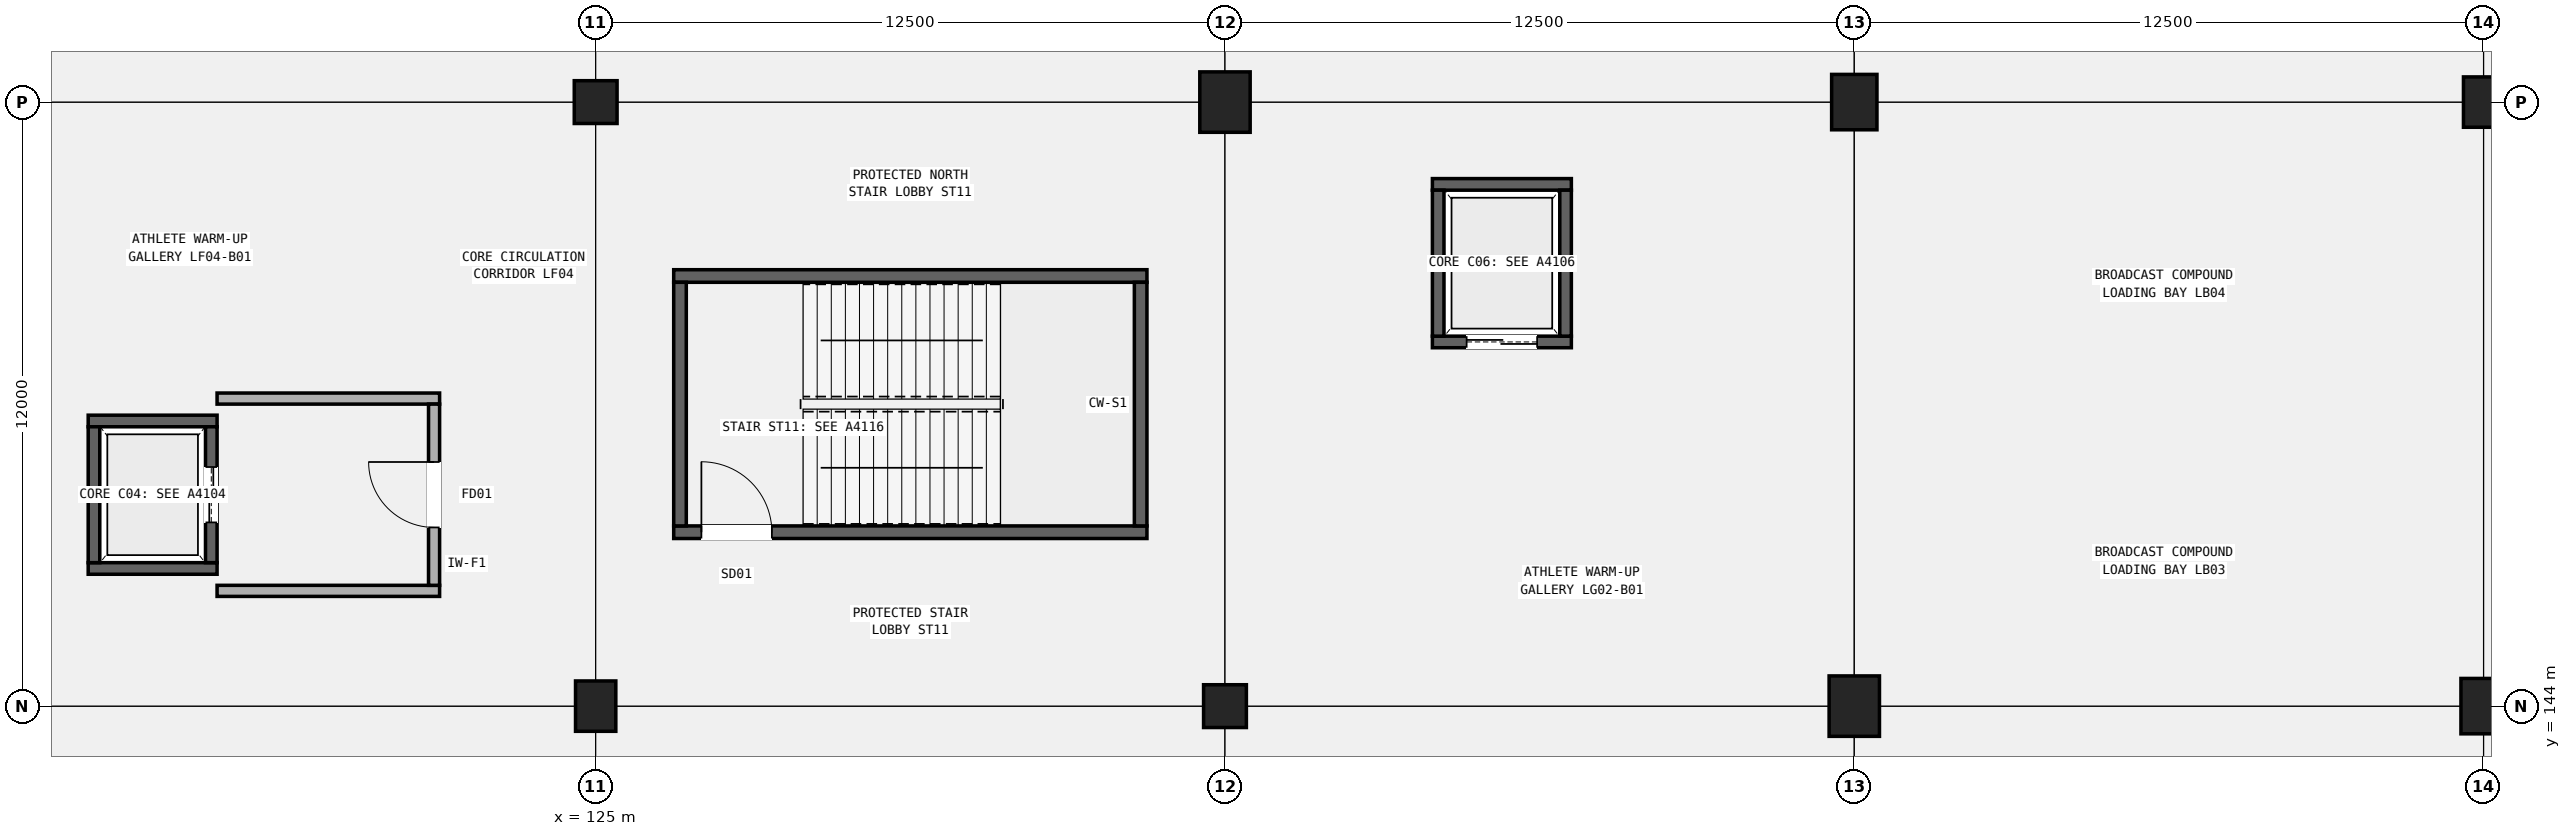
"""IFC4 building model, lengths in metres.
Left out: names, types, materials, properties, quantities, classifications, styles, units other than length and angle.
Written with IfcOpenShell. Run it as: python <this file> out.ifc"""

import sys

from ifc_helpers import new_model, si_unit, direction, frame, frame_2d, origin, origin_2d, place, context, subcontext, project, spatial, rectangle, circle, extrude, element, fill, save


model = new_model("IFC4")
c1 = context("Model", 3, precision=1e-05, world=origin(), true_north=direction((0.0, 1.0)))
c2 = subcontext(c1, "Body", "Model", "MODEL_VIEW")
j1 = project(units=[si_unit("LENGTHUNIT", "METRE"), si_unit("PLANEANGLEUNIT", "RADIAN")], contexts=[c1])
p1 = place(None, origin())
s1 = spatial("IfcSite", under=j1, at=p1, CompositionType="ELEMENT")
p2 = place(p1, origin())
s2 = spatial("IfcBuilding", under=s1, at=p2, CompositionType="ELEMENT")
p3 = place(p2, frame((0.0, 0.0, -4.8)))
s3 = spatial("IfcBuildingStorey", under=s2, at=p3, CompositionType="ELEMENT", Elevation=-4.8)
p4 = place(p3, frame((125.0, 144.0, 0.0), z_axis=(0.0, 0.0, 1.0), x_axis=(1.0, 0.0, 0.0)))
e1 = element("IfcColumn", 1, at=p4, inside=s3, PredefinedType="COLUMN", context=c2, shape_type="SweptSolid", body=[
    extrude(rectangle(XDim=0.8, YDim=1.0, at=origin_2d()), origin(), (0.0, 0.0, 1.0), 4.8),
])
for number, where, z_axis, x_axis in (
    (2, (125.0, 156.0, 0.0), (0.0, 0.0, 1.0), (1.0, 0.0, 0.0)),
    (3, (137.5, 144.0, 0.0), (0.0, 0.0, 1.0), (1.0, 0.0, 0.0)),
):
    element("IfcColumn", number, at=place(p3, frame(where, z_axis=z_axis, x_axis=x_axis)), inside=s3, PredefinedType="COLUMN", context=c2, shape_type="SweptSolid", body=[
        extrude(circle(Radius=0.425, at=origin_2d()), origin(), (0.0, 0.0, 1.0), 4.8),
    ])
for number, where, z_axis, x_axis in (
    (4, (137.5, 156.0, 0.0), (0.0, 0.0, 1.0), (1.0, 0.0, 0.0)),
    (5, (150.0, 144.0, 0.0), (0.0, 0.0, 1.0), (1.0, 0.0, 0.0)),
):
    element("IfcColumn", number, at=place(p3, frame(where, z_axis=z_axis, x_axis=x_axis)), inside=s3, PredefinedType="COLUMN", context=c2, shape_type="SweptSolid", body=[
        extrude(rectangle(XDim=1.0, YDim=1.2, at=origin_2d()), origin(), (0.0, 0.0, 1.0), 4.8),
    ])
for number, where, z_axis, x_axis in (
    (6, (150.0, 156.0, 0.0), (0.0, 0.0, 1.0), (1.0, 0.0, 0.0)),
    (7, (162.5, 144.0, 0.0), (0.0, 0.0, 1.0), (1.0, 0.0, 0.0)),
):
    element("IfcColumn", number, at=place(p3, frame(where, z_axis=z_axis, x_axis=x_axis)), inside=s3, PredefinedType="COLUMN", context=c2, shape_type="SweptSolid", body=[
        extrude(rectangle(XDim=0.9, YDim=1.1, at=origin_2d()), origin(), (0.0, 0.0, 1.0), 4.8),
    ])
p5 = place(p3, frame((162.5, 156.0, 0.0), z_axis=(0.0, 0.0, 1.0), x_axis=(1.0, 0.0, 0.0)))
e8 = element("IfcColumn", 8, at=p5, inside=s3, PredefinedType="COLUMN", context=c2, shape_type="SweptSolid", body=[
    extrude(rectangle(XDim=0.8, YDim=1.0, at=origin_2d()), origin(), (0.0, 0.0, 1.0), 4.8),
])
p6 = place(p3, frame((126.55, 147.455, 0.0), z_axis=(0.0, 0.0, 1.0), x_axis=(1.0, 0.0, 0.0)))
e9 = element("IfcWall", 9, at=p6, inside=s3, PredefinedType="SHEAR", context=c2, shape_type="SweptSolid", body=[
    extrude(rectangle(XDim=9.4, YDim=0.25, at=frame_2d((4.7, 0.0))), origin(), (0.0, 0.0, 1.0), 4.5),
])
p7 = place(p6, frame((0.55, 0.0, 0.0)))
e10 = element("IfcOpeningElement", 10, at=p7, cuts=e9, PredefinedType="OPENING", context=c2, shape_type="SweptSolid", body=[
    extrude(rectangle(XDim=1.4, YDim=2.15, at=frame_2d((0.7, 1.075))), frame((0.0, 0.135, 0.0), z_axis=(0.0, -1.0, 0.0), x_axis=(1.0, 0.0, 0.0)), (0.0, 0.0, 1.0), 0.27),
])
p8 = place(p3, frame((126.55, 152.545, 0.0), z_axis=(0.0, 0.0, 1.0), x_axis=(1.0, 0.0, 0.0)))
e11 = element("IfcWall", 11, at=p8, inside=s3, PredefinedType="SHEAR", context=c2, shape_type="SweptSolid", body=[
    extrude(rectangle(XDim=9.4, YDim=0.25, at=frame_2d((4.7, 0.0))), origin(), (0.0, 0.0, 1.0), 4.5),
])
for number, where, z_axis, x_axis in (
    (12, (126.675, 147.58, 0.0), (0.0, 0.0, 1.0), (0.0, 1.0, 0.0)),
    (13, (135.825, 147.58, 0.0), (0.0, 0.0, 1.0), (0.0, 1.0, 0.0)),
):
    element("IfcWall", number, at=place(p3, frame(where, z_axis=z_axis, x_axis=x_axis)), inside=s3, PredefinedType="SHEAR", context=c2, shape_type="SweptSolid", body=[
        extrude(rectangle(XDim=4.84, YDim=0.25, at=frame_2d((2.42, 0.0))), origin(), (0.0, 0.0, 1.0), 4.5),
    ])
for number, where, z_axis, x_axis in (
    (14, (114.92, 146.735, -0.65), (0.0, 0.0, 1.0), (1.0, 0.0, 0.0)),
    (15, (114.92, 149.665, -0.65), (0.0, 0.0, 1.0), (1.0, 0.0, 0.0)),
):
    element("IfcWall", number, at=place(p3, frame(where, z_axis=z_axis, x_axis=x_axis)), inside=s3, PredefinedType="SHEAR", context=c2, shape_type="SweptSolid", body=[
        extrude(rectangle(XDim=2.56, YDim=0.23, at=frame_2d((1.28, 0.0))), origin(), (0.0, 0.0, 1.0), 4.5),
    ])
p9 = place(p3, frame((115.035, 146.85, -0.65), z_axis=(0.0, 0.0, 1.0), x_axis=(0.0, 1.0, 0.0)))
e16 = element("IfcWall", 16, at=p9, inside=s3, PredefinedType="SHEAR", context=c2, shape_type="SweptSolid", body=[
    extrude(rectangle(XDim=2.7, YDim=0.23, at=frame_2d((1.35, 0.0))), origin(), (0.0, 0.0, 1.0), 4.5),
])
p10 = place(p3, frame((117.365, 146.85, -0.65), z_axis=(0.0, 0.0, 1.0), x_axis=(0.0, 1.0, 0.0)))
e17 = element("IfcWall", 17, at=p10, inside=s3, PredefinedType="SHEAR", context=c2, shape_type="SweptSolid", body=[
    extrude(rectangle(XDim=2.7, YDim=0.23, at=frame_2d((1.35, 0.0))), origin(), (0.0, 0.0, 1.0), 4.5),
])
p11 = place(p10, frame((0.8, 0.0, 0.65)))
e18 = element("IfcOpeningElement", 18, at=p11, cuts=e17, PredefinedType="OPENING", context=c2, shape_type="SweptSolid", body=[
    extrude(rectangle(XDim=1.1, YDim=2.15, at=frame_2d((0.55, 1.075))), frame((0.0, 0.125, 0.0), z_axis=(0.0, -1.0, 0.0), x_axis=(1.0, 0.0, 0.0)), (0.0, 0.0, 1.0), 0.25),
])
for number, where, z_axis, x_axis in (
    (19, (117.48, 146.29, -0.65), (0.0, 0.0, 1.0), (1.0, 0.0, 0.0)),
    (20, (117.48, 150.11, -0.65), (0.0, 0.0, 1.0), (1.0, 0.0, 0.0)),
):
    element("IfcWall", number, at=place(p3, frame(where, z_axis=z_axis, x_axis=x_axis)), inside=s3, PredefinedType="SOLIDWALL", context=c2, shape_type="SweptSolid", body=[
        extrude(rectangle(XDim=4.42, YDim=0.22, at=frame_2d((2.21, 0.0))), origin(), (0.0, 0.0, 1.0), 4.57),
    ])
p12 = place(p3, frame((121.79, 146.4, -0.65), z_axis=(0.0, 0.0, 1.0), x_axis=(0.0, 1.0, 0.0)))
e21 = element("IfcWall", 21, at=p12, inside=s3, PredefinedType="SOLIDWALL", context=c2, shape_type="SweptSolid", body=[
    extrude(rectangle(XDim=3.6, YDim=0.22, at=frame_2d((1.8, 0.0))), origin(), (0.0, 0.0, 1.0), 4.57),
])
p13 = place(p12, frame((1.15, 0.0, 0.65)))
e22 = element("IfcOpeningElement", 22, at=p13, cuts=e21, PredefinedType="OPENING", context=c2, shape_type="SweptSolid", body=[
    extrude(rectangle(XDim=1.3, YDim=2.15, at=frame_2d((0.65, 1.075))), frame((0.0, 0.12, 0.0), z_axis=(0.0, -1.0, 0.0), x_axis=(1.0, 0.0, 0.0)), (0.0, 0.0, 1.0), 0.24),
])
p14 = place(p3, frame((141.62, 151.235, -0.65), z_axis=(0.0, 0.0, 1.0), x_axis=(1.0, 0.0, 0.0)))
e23 = element("IfcWall", 23, at=p14, inside=s3, PredefinedType="SHEAR", context=c2, shape_type="SweptSolid", body=[
    extrude(rectangle(XDim=2.76, YDim=0.23, at=frame_2d((1.38, 0.0))), origin(), (0.0, 0.0, 1.0), 4.5),
])
p15 = place(p14, frame((0.68, 0.0, 0.65)))
e24 = element("IfcOpeningElement", 24, at=p15, cuts=e23, PredefinedType="OPENING", context=c2, shape_type="SweptSolid", body=[
    extrude(rectangle(XDim=1.4, YDim=2.25, at=frame_2d((0.7, 1.125))), frame((0.0, 0.125, 0.0), z_axis=(0.0, -1.0, 0.0), x_axis=(1.0, 0.0, 0.0)), (0.0, 0.0, 1.0), 0.25),
])
p16 = place(p3, frame((141.62, 154.365, -0.65), z_axis=(0.0, 0.0, 1.0), x_axis=(1.0, 0.0, 0.0)))
e25 = element("IfcWall", 25, at=p16, inside=s3, PredefinedType="SHEAR", context=c2, shape_type="SweptSolid", body=[
    extrude(rectangle(XDim=2.76, YDim=0.23, at=frame_2d((1.38, 0.0))), origin(), (0.0, 0.0, 1.0), 4.5),
])
for number, where, z_axis, x_axis in (
    (26, (141.735, 151.35, -0.65), (0.0, 0.0, 1.0), (0.0, 1.0, 0.0)),
    (27, (144.265, 151.35, -0.65), (0.0, 0.0, 1.0), (0.0, 1.0, 0.0)),
):
    element("IfcWall", number, at=place(p3, frame(where, z_axis=z_axis, x_axis=x_axis)), inside=s3, PredefinedType="SHEAR", context=c2, shape_type="SweptSolid", body=[
        extrude(rectangle(XDim=2.9, YDim=0.23, at=frame_2d((1.45, 0.0))), origin(), (0.0, 0.0, 1.0), 4.5),
    ])
p17 = place(p7, origin())
e28 = element("IfcDoor", 28, at=p17, inside=s3, OperationType="SINGLE_SWING_LEFT", PredefinedType="DOOR", context=c2, shape_type="SweptSolid", body=[
    extrude(rectangle(XDim=1.4, YDim=2.15, at=frame_2d((0.7, 1.075))), frame((0.0, 0.025, 0.0), z_axis=(0.0, -1.0, 0.0), x_axis=(1.0, 0.0, 0.0)), (0.0, 0.0, 1.0), 0.05),
])
fill(e10, e28)
p18 = place(p11, origin())
e29 = element("IfcDoor", 29, at=p18, inside=s3, OperationType="DOUBLE_DOOR_SLIDING", PredefinedType="DOOR", context=c2, shape_type="SweptSolid", body=[
    extrude(rectangle(XDim=1.1, YDim=2.15, at=frame_2d((0.55, 1.075))), frame((0.0, 0.025, 0.0), z_axis=(0.0, -1.0, 0.0), x_axis=(1.0, 0.0, 0.0)), (0.0, 0.0, 1.0), 0.05),
])
fill(e18, e29)
p19 = place(p13, origin())
e30 = element("IfcDoor", 30, at=p19, inside=s3, OperationType="SINGLE_SWING_RIGHT", PredefinedType="DOOR", context=c2, shape_type="SweptSolid", body=[
    extrude(rectangle(XDim=1.3, YDim=2.15, at=frame_2d((0.65, 1.075))), frame((0.0, 0.025, 0.0), z_axis=(0.0, -1.0, 0.0), x_axis=(1.0, 0.0, 0.0)), (0.0, 0.0, 1.0), 0.05),
])
fill(e22, e30)
p20 = place(p15, origin())
e31 = element("IfcDoor", 31, at=p20, inside=s3, OperationType="DOUBLE_DOOR_SLIDING", PredefinedType="DOOR", context=c2, shape_type="SweptSolid", body=[
    extrude(rectangle(XDim=1.4, YDim=2.25, at=frame_2d((0.7, 1.125))), frame((0.0, 0.025, 0.0), z_axis=(0.0, -1.0, 0.0), x_axis=(1.0, 0.0, 0.0)), (0.0, 0.0, 1.0), 0.05),
])
fill(e24, e31)
save(model, sys.argv[1])
